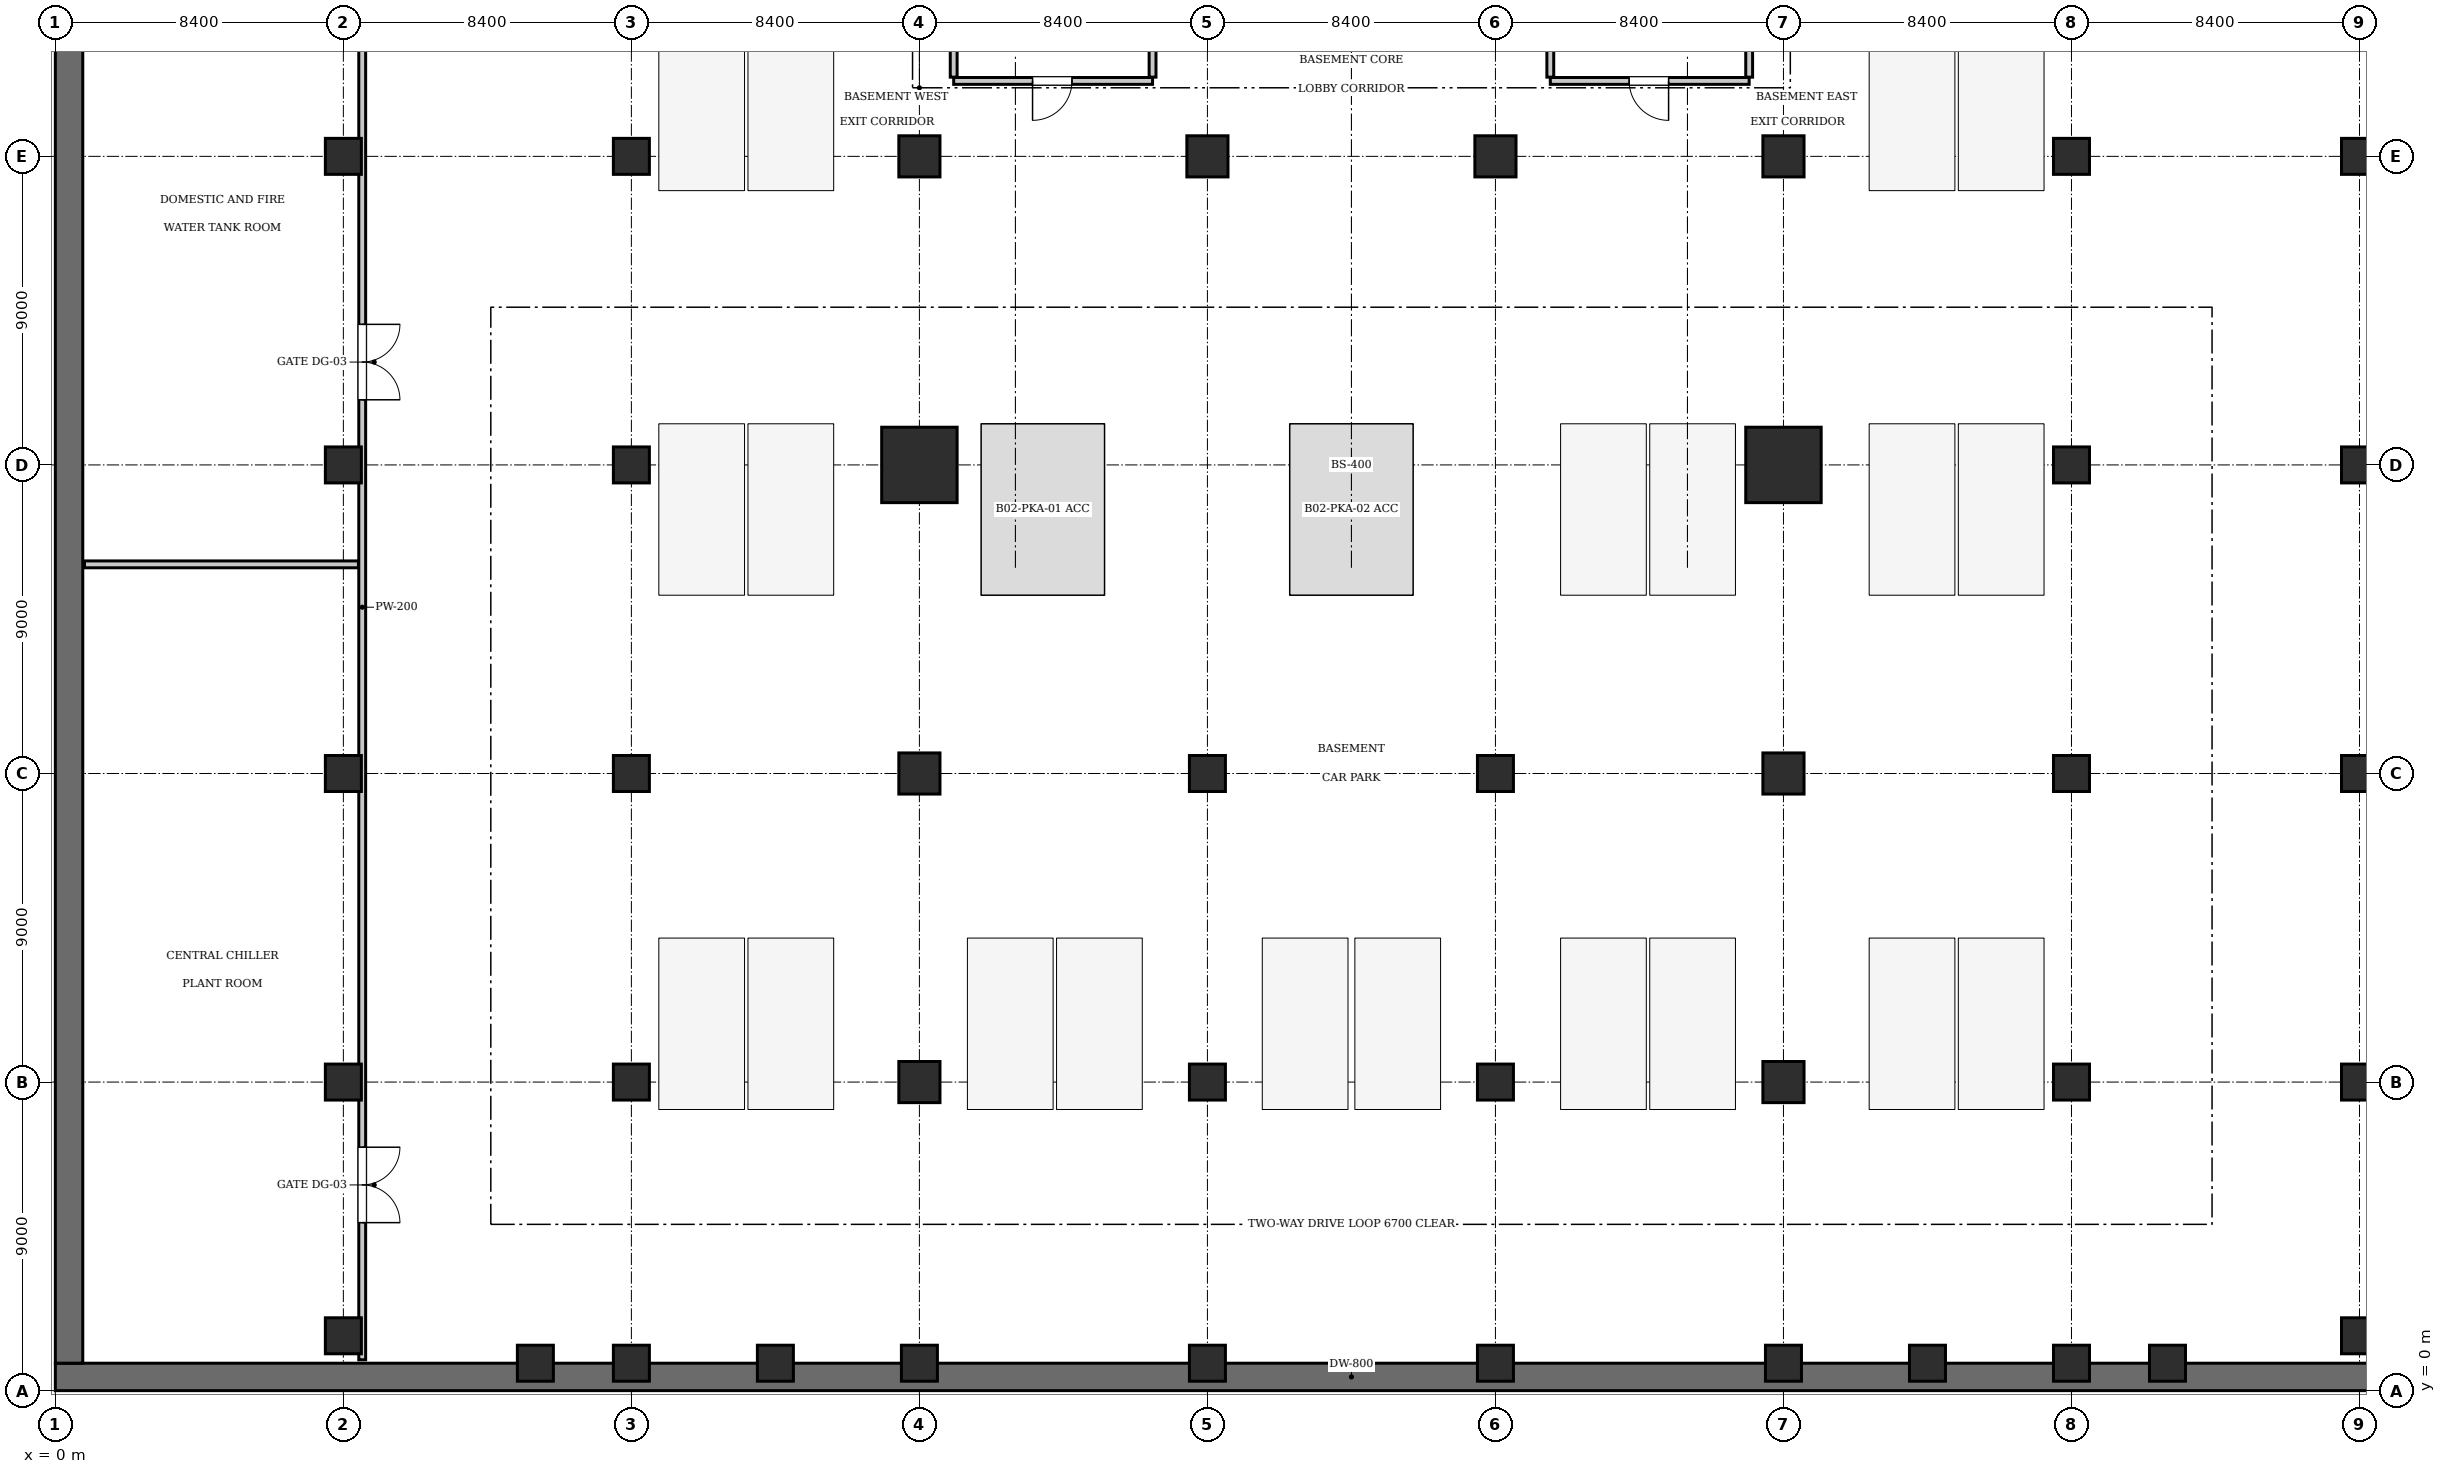
"""IFC4 building model, lengths in metres.
Left out: names, types, materials, properties, quantities, classifications, styles, units other than length and angle.
Written with IfcOpenShell. Run it as: python <this file> out.ifc"""

import sys

from ifc_helpers import new_model, si_unit, direction, frame, frame_2d, origin, origin_2d, place, context, subcontext, project, spatial, rectangle, extrude, element, fill, save


model = new_model("IFC4")
c1 = context("Model", 3, precision=1e-05, world=origin(), true_north=direction((0.0, 1.0)))
c2 = subcontext(c1, "Body", "Model", "MODEL_VIEW")
j1 = project(units=[si_unit("LENGTHUNIT", "METRE"), si_unit("PLANEANGLEUNIT", "RADIAN")], contexts=[c1])
p1 = place(None, origin())
s1 = spatial("IfcSite", under=j1, at=p1, CompositionType="ELEMENT")
p2 = place(p1, origin())
s2 = spatial("IfcBuilding", under=s1, at=p2, CompositionType="ELEMENT")
p3 = place(p2, frame((0.0, 0.0, -9.8)))
s3 = spatial("IfcBuildingStorey", under=s2, at=p3, CompositionType="ELEMENT", Elevation=-9.8)
p4 = place(p3, frame((0.0, 0.4, 0.0), z_axis=(0.0, 0.0, 1.0), x_axis=(1.0, 0.0, 0.0)))
e1 = element("IfcWall", 1, at=p4, inside=s3, PredefinedType="USERDEFINED", context=c2, shape_type="SweptSolid", body=[
    extrude(rectangle(XDim=75.6, YDim=0.8, at=frame_2d((37.8, 0.0))), origin(), (0.0, 0.0, 1.0), 4.55),
])
p5 = place(p3, frame((0.4, 0.8, 0.0), z_axis=(0.0, 0.0, 1.0), x_axis=(0.0, 1.0, 0.0)))
e2 = element("IfcWall", 2, at=p5, inside=s3, PredefinedType="USERDEFINED", context=c2, shape_type="SweptSolid", body=[
    extrude(rectangle(XDim=52.4, YDim=0.8, at=frame_2d((26.2, 0.0))), origin(), (0.0, 0.0, 1.0), 4.55),
])
for number, where, z_axis, x_axis in (
    (3, (25.2, 27.0, -0.4), (0.0, 0.0, 1.0), (1.0, 0.0, 0.0)),
    (4, (50.4, 27.0, -0.4), (0.0, 0.0, 1.0), (1.0, 0.0, 0.0)),
):
    element("IfcColumn", number, at=place(p3, frame(where, z_axis=z_axis, x_axis=x_axis)), inside=s3, PredefinedType="COLUMN", context=c2, shape_type="SweptSolid", body=[
        extrude(rectangle(XDim=2.2, YDim=2.2, at=origin_2d()), origin(), (0.0, 0.0, 1.0), 4.95),
    ])
for number, where, z_axis, x_axis in (
    (5, (25.2, 36.0, -0.4), (0.0, 0.0, 1.0), (1.0, 0.0, 0.0)),
    (6, (33.6, 36.0, -0.4), (0.0, 0.0, 1.0), (1.0, 0.0, 0.0)),
    (7, (42.0, 36.0, -0.4), (0.0, 0.0, 1.0), (1.0, 0.0, 0.0)),
    (8, (50.4, 36.0, -0.4), (0.0, 0.0, 1.0), (1.0, 0.0, 0.0)),
    (9, (25.2, 18.0, -0.4), (0.0, 0.0, 1.0), (1.0, 0.0, 0.0)),
    (10, (50.4, 18.0, -0.4), (0.0, 0.0, 1.0), (1.0, 0.0, 0.0)),
    (11, (25.2, 9.0, -0.4), (0.0, 0.0, 1.0), (1.0, 0.0, 0.0)),
    (12, (50.4, 9.0, -0.4), (0.0, 0.0, 1.0), (1.0, 0.0, 0.0)),
):
    element("IfcColumn", number, at=place(p3, frame(where, z_axis=z_axis, x_axis=x_axis)), inside=s3, PredefinedType="COLUMN", context=c2, shape_type="SweptSolid", body=[
        extrude(rectangle(XDim=1.2, YDim=1.2, at=origin_2d()), origin(), (0.0, 0.0, 1.0), 4.95),
    ])
for number, where, z_axis, x_axis in (
    (13, (33.6, 9.0, -0.4), (0.0, 0.0, 1.0), (1.0, 0.0, 0.0)),
    (14, (42.0, 9.0, -0.4), (0.0, 0.0, 1.0), (1.0, 0.0, 0.0)),
    (15, (33.6, 18.0, -0.4), (0.0, 0.0, 1.0), (1.0, 0.0, 0.0)),
    (16, (42.0, 18.0, -0.4), (0.0, 0.0, 1.0), (1.0, 0.0, 0.0)),
    (17, (16.8, 9.0, -0.4), (0.0, 0.0, 1.0), (1.0, 0.0, 0.0)),
    (18, (58.8, 9.0, -0.4), (0.0, 0.0, 1.0), (1.0, 0.0, 0.0)),
    (19, (16.8, 18.0, -0.4), (0.0, 0.0, 1.0), (1.0, 0.0, 0.0)),
    (20, (58.8, 18.0, -0.4), (0.0, 0.0, 1.0), (1.0, 0.0, 0.0)),
    (21, (16.8, 27.0, -0.4), (0.0, 0.0, 1.0), (1.0, 0.0, 0.0)),
    (22, (58.8, 27.0, -0.4), (0.0, 0.0, 1.0), (1.0, 0.0, 0.0)),
    (23, (16.8, 36.0, -0.4), (0.0, 0.0, 1.0), (1.0, 0.0, 0.0)),
    (24, (58.8, 36.0, -0.4), (0.0, 0.0, 1.0), (1.0, 0.0, 0.0)),
    (25, (8.4, 1.6, -0.4), (0.0, 0.0, 1.0), (1.0, 0.0, 0.0)),
    (26, (67.2, 1.6, -0.4), (0.0, 0.0, 1.0), (1.0, 0.0, 0.0)),
    (27, (8.4, 9.0, -0.4), (0.0, 0.0, 1.0), (1.0, 0.0, 0.0)),
    (28, (67.2, 9.0, -0.4), (0.0, 0.0, 1.0), (1.0, 0.0, 0.0)),
    (29, (8.4, 18.0, -0.4), (0.0, 0.0, 1.0), (1.0, 0.0, 0.0)),
    (30, (67.2, 18.0, -0.4), (0.0, 0.0, 1.0), (1.0, 0.0, 0.0)),
    (31, (8.4, 27.0, -0.4), (0.0, 0.0, 1.0), (1.0, 0.0, 0.0)),
    (32, (67.2, 27.0, -0.4), (0.0, 0.0, 1.0), (1.0, 0.0, 0.0)),
    (33, (8.4, 36.0, -0.4), (0.0, 0.0, 1.0), (1.0, 0.0, 0.0)),
    (34, (67.2, 36.0, -0.4), (0.0, 0.0, 1.0), (1.0, 0.0, 0.0)),
    (35, (16.8, 0.8, -0.4), (0.0, 0.0, 1.0), (1.0, 0.0, 0.0)),
    (36, (25.2, 0.8, -0.4), (0.0, 0.0, 1.0), (1.0, 0.0, 0.0)),
    (37, (33.6, 0.8, -0.4), (0.0, 0.0, 1.0), (1.0, 0.0, 0.0)),
    (38, (42.0, 0.8, -0.4), (0.0, 0.0, 1.0), (1.0, 0.0, 0.0)),
    (39, (50.4, 0.8, -0.4), (0.0, 0.0, 1.0), (1.0, 0.0, 0.0)),
    (40, (58.8, 0.8, -0.4), (0.0, 0.0, 1.0), (1.0, 0.0, 0.0)),
    (41, (14.0, 0.8, -0.4), (0.0, 0.0, 1.0), (1.0, 0.0, 0.0)),
    (42, (21.0, 0.8, -0.4), (0.0, 0.0, 1.0), (1.0, 0.0, 0.0)),
    (43, (54.6, 0.8, -0.4), (0.0, 0.0, 1.0), (1.0, 0.0, 0.0)),
    (44, (61.6, 0.8, -0.4), (0.0, 0.0, 1.0), (1.0, 0.0, 0.0)),
):
    element("IfcColumn", number, at=place(p3, frame(where, z_axis=z_axis, x_axis=x_axis)), inside=s3, PredefinedType="COLUMN", context=c2, shape_type="SweptSolid", body=[
        extrude(rectangle(XDim=1.05, YDim=1.05, at=origin_2d()), origin(), (0.0, 0.0, 1.0), 4.95),
    ])
p6 = place(p3, frame((26.2, 38.2, 0.0), z_axis=(0.0, 0.0, 1.0), x_axis=(1.0, 0.0, 0.0)))
e45 = element("IfcWall", 45, at=p6, inside=s3, PredefinedType="PARTITIONING", context=c2, shape_type="SweptSolid", body=[
    extrude(rectangle(XDim=5.8, YDim=0.2, at=frame_2d((2.9, 0.0))), origin(), (0.0, 0.0, 1.0), 4.2),
])
p7 = place(p6, frame((2.3, 0.0, 0.0)))
e46 = element("IfcOpeningElement", 46, at=p7, cuts=e45, PredefinedType="OPENING", context=c2, shape_type="SweptSolid", body=[
    extrude(rectangle(XDim=1.15, YDim=2.15, at=frame_2d((0.575, 1.075))), frame((0.0, 0.11, 0.0), z_axis=(0.0, -1.0, 0.0), x_axis=(1.0, 0.0, 0.0)), (0.0, 0.0, 1.0), 0.22),
])
for number, where, z_axis, x_axis in (
    (47, (26.2, 38.31, 0.0), (0.0, 0.0, 1.0), (0.0, 1.0, 0.0)),
    (48, (32.0, 38.31, 0.0), (0.0, 0.0, 1.0), (0.0, 1.0, 0.0)),
):
    element("IfcWall", number, at=place(p3, frame(where, z_axis=z_axis, x_axis=x_axis)), inside=s3, PredefinedType="PARTITIONING", context=c2, shape_type="SweptSolid", body=[
        extrude(rectangle(XDim=3.07, YDim=0.2, at=frame_2d((1.535, 0.0))), origin(), (0.0, 0.0, 1.0), 4.2),
    ])
p8 = place(p3, frame((43.6, 38.2, 0.0), z_axis=(0.0, 0.0, 1.0), x_axis=(1.0, 0.0, 0.0)))
e49 = element("IfcWall", 49, at=p8, inside=s3, PredefinedType="PARTITIONING", context=c2, shape_type="SweptSolid", body=[
    extrude(rectangle(XDim=5.8, YDim=0.2, at=frame_2d((2.9, 0.0))), origin(), (0.0, 0.0, 1.0), 4.2),
])
p9 = place(p8, frame((2.3, 0.0, 0.0)))
e50 = element("IfcOpeningElement", 50, at=p9, cuts=e49, PredefinedType="OPENING", context=c2, shape_type="SweptSolid", body=[
    extrude(rectangle(XDim=1.15, YDim=2.15, at=frame_2d((0.575, 1.075))), frame((0.0, 0.11, 0.0), z_axis=(0.0, -1.0, 0.0), x_axis=(1.0, 0.0, 0.0)), (0.0, 0.0, 1.0), 0.22),
])
for number, where, z_axis, x_axis in (
    (51, (43.6, 38.31, 0.0), (0.0, 0.0, 1.0), (0.0, 1.0, 0.0)),
    (52, (49.4, 38.31, 0.0), (0.0, 0.0, 1.0), (0.0, 1.0, 0.0)),
):
    element("IfcWall", number, at=place(p3, frame(where, z_axis=z_axis, x_axis=x_axis)), inside=s3, PredefinedType="PARTITIONING", context=c2, shape_type="SweptSolid", body=[
        extrude(rectangle(XDim=3.07, YDim=0.2, at=frame_2d((1.535, 0.0))), origin(), (0.0, 0.0, 1.0), 4.2),
    ])
p10 = place(p3, frame((8.95, 0.9, 0.0), z_axis=(0.0, 0.0, 1.0), x_axis=(0.0, 1.0, 0.0)))
e53 = element("IfcWall", 53, at=p10, inside=s3, PredefinedType="PARTITIONING", context=c2, shape_type="SweptSolid", body=[
    extrude(rectangle(XDim=43.9, YDim=0.2, at=frame_2d((21.95, 0.0))), origin(), (0.0, 0.0, 1.0), 4.2),
])
p11 = place(p10, frame((4.0, 0.0, 0.0)))
e54 = element("IfcOpeningElement", 54, at=p11, cuts=e53, PredefinedType="OPENING", context=c2, shape_type="SweptSolid", body=[
    extrude(rectangle(XDim=2.2, YDim=2.4, at=frame_2d((1.1, 1.2))), frame((0.0, 0.11, 0.0), z_axis=(0.0, -1.0, 0.0), x_axis=(1.0, 0.0, 0.0)), (0.0, 0.0, 1.0), 0.22),
])
p12 = place(p10, frame((28.0, 0.0, 0.0)))
e55 = element("IfcOpeningElement", 55, at=p12, cuts=e53, PredefinedType="OPENING", context=c2, shape_type="SweptSolid", body=[
    extrude(rectangle(XDim=2.2, YDim=2.4, at=frame_2d((1.1, 1.2))), frame((0.0, 0.11, 0.0), z_axis=(0.0, -1.0, 0.0), x_axis=(1.0, 0.0, 0.0)), (0.0, 0.0, 1.0), 0.22),
])
p13 = place(p3, frame((0.85, 24.1, 0.0), z_axis=(0.0, 0.0, 1.0), x_axis=(1.0, 0.0, 0.0)))
e56 = element("IfcWall", 56, at=p13, inside=s3, PredefinedType="PARTITIONING", context=c2, shape_type="SweptSolid", body=[
    extrude(rectangle(XDim=7.99, YDim=0.2, at=frame_2d((3.995, 0.0))), origin(), (0.0, 0.0, 1.0), 4.2),
])
p14 = place(p7, frame((1.15, 0.0, 0.0), z_axis=(0.0, 0.0, 1.0), x_axis=(-1.0, 0.0, 0.0)))
e57 = element("IfcDoor", 57, at=p14, inside=s3, OperationType="SINGLE_SWING_RIGHT", PredefinedType="DOOR", context=c2, shape_type="SweptSolid", body=[
    extrude(rectangle(XDim=1.15, YDim=2.15, at=frame_2d((0.575, 1.075))), frame((0.0, 0.025, 0.0), z_axis=(0.0, -1.0, 0.0), x_axis=(1.0, 0.0, 0.0)), (0.0, 0.0, 1.0), 0.05),
])
fill(e46, e57)
p15 = place(p9, frame((1.15, 0.0, 0.0), z_axis=(0.0, 0.0, 1.0), x_axis=(-1.0, 0.0, 0.0)))
e58 = element("IfcDoor", 58, at=p15, inside=s3, OperationType="SINGLE_SWING_LEFT", PredefinedType="DOOR", context=c2, shape_type="SweptSolid", body=[
    extrude(rectangle(XDim=1.15, YDim=2.15, at=frame_2d((0.575, 1.075))), frame((0.0, 0.025, 0.0), z_axis=(0.0, -1.0, 0.0), x_axis=(1.0, 0.0, 0.0)), (0.0, 0.0, 1.0), 0.05),
])
fill(e50, e58)
p16 = place(p11, frame((2.2, 0.0, 0.0), z_axis=(0.0, 0.0, 1.0), x_axis=(-1.0, 0.0, 0.0)))
e59 = element("IfcDoor", 59, at=p16, inside=s3, OperationType="DOUBLE_DOOR_SINGLE_SWING", PredefinedType="GATE", context=c2, shape_type="SweptSolid", body=[
    extrude(rectangle(XDim=2.2, YDim=2.4, at=frame_2d((1.1, 1.2))), frame((0.0, 0.025, 0.0), z_axis=(0.0, -1.0, 0.0), x_axis=(1.0, 0.0, 0.0)), (0.0, 0.0, 1.0), 0.05),
])
fill(e54, e59)
p17 = place(p12, frame((2.2, 0.0, 0.0), z_axis=(0.0, 0.0, 1.0), x_axis=(-1.0, 0.0, 0.0)))
e60 = element("IfcDoor", 60, at=p17, inside=s3, OperationType="DOUBLE_DOOR_SINGLE_SWING", PredefinedType="GATE", context=c2, shape_type="SweptSolid", body=[
    extrude(rectangle(XDim=2.2, YDim=2.4, at=frame_2d((1.1, 1.2))), frame((0.0, 0.025, 0.0), z_axis=(0.0, -1.0, 0.0), x_axis=(1.0, 0.0, 0.0)), (0.0, 0.0, 1.0), 0.05),
])
fill(e55, e60)
save(model, sys.argv[1])
